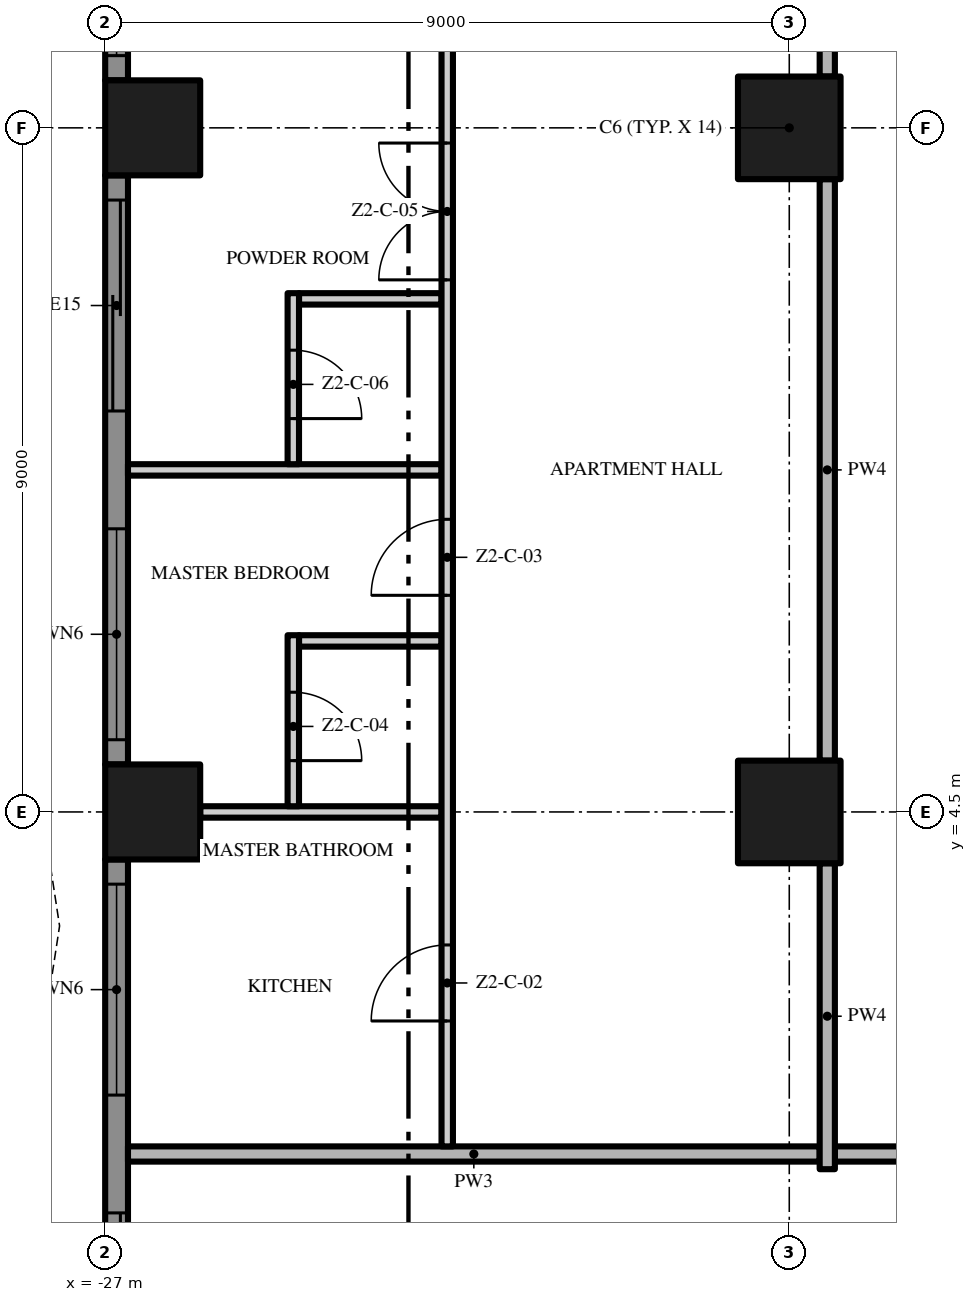
"""IFC4 building model, lengths in metres.
Left out: names, types, materials, properties, quantities, classifications, styles, units other than length and angle.
Written with IfcOpenShell. Run it as: python <this file> out.ifc"""

import sys

from ifc_helpers import new_model, si_unit, direction, frame, frame_2d, origin, origin_2d, place, context, subcontext, project, spatial, polyline, rectangle, outline, extrude, element, fill, save


model = new_model("IFC4")
c1 = context("Model", 3, precision=1e-05, world=origin(), true_north=direction((0.0, 1.0)))
c2 = subcontext(c1, "Body", "Model", "MODEL_VIEW")
j1 = project(units=[si_unit("LENGTHUNIT", "METRE"), si_unit("PLANEANGLEUNIT", "RADIAN")], contexts=[c1])
p1 = place(None, origin())
s1 = spatial("IfcSite", under=j1, at=p1, CompositionType="ELEMENT")
p2 = place(p1, origin())
s2 = spatial("IfcBuilding", under=s1, at=p2, CompositionType="ELEMENT")
p3 = place(p2, frame((0.0, 0.0, 99.8)))
s3 = spatial("IfcBuildingStorey", under=s2, at=p3, CompositionType="ELEMENT", Elevation=99.8)
for number, where, z_axis, x_axis in (
    (1, (-18.0, 13.5, 0.0), (0.0, 0.0, 1.0), (1.0, 0.0, 0.0)),
    (2, (-18.0, 4.5, 0.0), (0.0, 0.0, 1.0), (1.0, 0.0, 0.0)),
):
    element("IfcColumn", number, at=place(p3, frame(where, z_axis=z_axis, x_axis=x_axis)), inside=s3, PredefinedType="COLUMN", context=c2, shape_type="SweptSolid", body=[
        extrude(rectangle(XDim=1.35, YDim=1.35, at=origin_2d()), origin(), (0.0, 0.0, 1.0), 3.5),
    ])
for number, where, z_axis, x_axis in (
    (3, (-26.375, 13.5, 0.0), (0.0, 0.0, 1.0), (1.0, 0.0, 0.0)),
    (4, (-26.375, 4.5, 0.0), (0.0, 0.0, 1.0), (1.0, 0.0, 0.0)),
):
    element("IfcColumn", number, at=place(p3, frame(where, z_axis=z_axis, x_axis=x_axis)), inside=s3, PredefinedType="COLUMN", context=c2, shape_type="SweptSolid", body=[
        extrude(rectangle(XDim=1.25, YDim=1.25, at=origin_2d()), origin(), (0.0, 0.0, 1.0), 3.5),
    ])
p4 = place(p3, frame((-26.85, 14.125, 0.0), z_axis=(0.0, 0.0, 1.0), x_axis=(0.0, 1.0, 0.0)))
e5 = element("IfcWall", 5, at=p4, inside=s3, PredefinedType="SOLIDWALL", context=c2, shape_type="SweptSolid", body=[
    extrude(rectangle(XDim=3.575, YDim=0.3, at=frame_2d((1.788, 0.0))), origin(), (0.0, 0.0, 1.0), 3.5),
])
p5 = place(p4, frame((0.325, 0.0, 0.45)))
e6 = element("IfcOpeningElement", 6, at=p5, cuts=e5, PredefinedType="OPENING", context=c2, shape_type="SweptSolid", body=[
    extrude(rectangle(XDim=2.775, YDim=2.65, at=frame_2d((1.387, 1.325))), frame((0.0, 0.16, 0.0), z_axis=(0.0, -1.0, 0.0), x_axis=(1.0, 0.0, 0.0)), (0.0, 0.0, 1.0), 0.32),
])
p6 = place(p3, frame((-26.85, 5.125, 0.0), z_axis=(0.0, 0.0, 1.0), x_axis=(0.0, 1.0, 0.0)))
e7 = element("IfcWall", 7, at=p6, inside=s3, PredefinedType="SOLIDWALL", context=c2, shape_type="SweptSolid", body=[
    extrude(rectangle(XDim=7.75, YDim=0.3, at=frame_2d((3.875, 0.0))), origin(), (0.0, 0.0, 1.0), 3.5),
])
p7 = place(p6, frame((4.65, 0.0, 0.0)))
e8 = element("IfcOpeningElement", 8, at=p7, cuts=e7, PredefinedType="OPENING", context=c2, shape_type="SweptSolid", body=[
    extrude(rectangle(XDim=2.775, YDim=2.4, at=frame_2d((1.387, 1.2))), frame((0.0, 0.16, 0.0), z_axis=(0.0, -1.0, 0.0), x_axis=(1.0, 0.0, 0.0)), (0.0, 0.0, 1.0), 0.32),
])
p8 = place(p6, frame((0.325, 0.0, 0.45)))
e9 = element("IfcOpeningElement", 9, at=p8, cuts=e7, PredefinedType="OPENING", context=c2, shape_type="SweptSolid", body=[
    extrude(rectangle(XDim=2.775, YDim=2.65, at=frame_2d((1.387, 1.325))), frame((0.0, 0.16, 0.0), z_axis=(0.0, -1.0, 0.0), x_axis=(1.0, 0.0, 0.0)), (0.0, 0.0, 1.0), 0.32),
])
p9 = place(p3, frame((-26.85, -3.875, 0.0), z_axis=(0.0, 0.0, 1.0), x_axis=(0.0, 1.0, 0.0)))
e10 = element("IfcWall", 10, at=p9, inside=s3, PredefinedType="SOLIDWALL", context=c2, shape_type="SweptSolid", body=[
    extrude(rectangle(XDim=7.75, YDim=0.3, at=frame_2d((3.875, 0.0))), origin(), (0.0, 0.0, 1.0), 3.5),
])
p10 = place(p9, frame((4.65, 0.0, 0.45)))
e11 = element("IfcOpeningElement", 11, at=p10, cuts=e10, PredefinedType="OPENING", context=c2, shape_type="SweptSolid", body=[
    extrude(rectangle(XDim=2.775, YDim=2.65, at=frame_2d((1.387, 1.325))), frame((0.0, 0.16, 0.0), z_axis=(0.0, -1.0, 0.0), x_axis=(1.0, 0.0, 0.0)), (0.0, 0.0, 1.0), 0.32),
])
p11 = place(p9, frame((0.325, 0.0, 0.0)))
e12 = element("IfcOpeningElement", 12, at=p11, cuts=e10, PredefinedType="OPENING", context=c2, shape_type="SweptSolid", body=[
    extrude(rectangle(XDim=2.775, YDim=2.4, at=frame_2d((1.387, 1.2))), frame((0.0, 0.16, 0.0), z_axis=(0.0, -1.0, 0.0), x_axis=(1.0, 0.0, 0.0)), (0.0, 0.0, 1.0), 0.32),
])
p12 = place(p3, origin())
e13 = element("IfcWall", 13, at=p12, inside=s3, PredefinedType="USERDEFINED", context=c2, shape_type="SweptSolid", body=[
    extrude(outline(polyline([(-27.6, 18.0), (-27.829, 16.5), (-28.429, 15.0), (-29.171, 13.5), (-29.771, 12.0), (-30.0, 10.5), (-29.771, 9.0), (-29.171, 7.5), (-28.429, 6.0), (-27.829, 4.5), (-27.6, 3.0), (-27.829, 1.5), (-28.429, 0.0), (-29.171, -1.5), (-29.771, -3.0), (-30.0, -4.5), (-29.771, -6.0), (-29.171, -7.5), (-28.429, -9.0), (-27.829, -10.5), (-27.6, -12.0), (-27.829, -13.5), (-28.429, -15.0), (-29.171, -16.5), (-29.771, -18.0), (-29.539, -18.093), (-28.942, -16.602), (-28.201, -15.102), (-27.586, -13.566), (-27.347, -12.0), (-27.586, -10.434), (-28.201, -8.898), (-28.942, -7.398), (-29.528, -5.934), (-29.747, -4.5), (-29.528, -3.066), (-28.942, -1.602), (-28.201, -0.102), (-27.586, 1.434), (-27.347, 3.0), (-27.586, 4.566), (-28.201, 6.102), (-28.942, 7.602), (-29.528, 9.066), (-29.747, 10.5), (-29.528, 11.934), (-28.942, 13.398), (-28.201, 14.898), (-27.586, 16.434), (-27.353, 17.962), (-27.6, 18.0)])), origin(), (0.0, 0.0, 1.0), 0.9),
])
p13 = place(p3, frame((-0.1, 0.0, 0.0), z_axis=(0.0, 0.0, 1.0), x_axis=(-1.0, 0.0, 0.0)))
e14 = element("IfcWall", 14, at=p13, inside=s3, PredefinedType="PARTITIONING", context=c2, shape_type="SweptSolid", body=[
    extrude(rectangle(XDim=17.3, YDim=0.2, at=frame_2d((8.65, 0.0))), origin(), (0.0, 0.0, 1.0), 3.5),
])
p14 = place(p13, frame((8.15, 0.0, 0.0)))
e15 = element("IfcOpeningElement", 15, at=p14, cuts=e14, PredefinedType="OPENING", context=c2, shape_type="SweptSolid", body=[
    extrude(rectangle(XDim=1.5, YDim=2.4, at=frame_2d((0.75, 1.2))), frame((0.0, 0.11, 0.0), z_axis=(0.0, -1.0, 0.0), x_axis=(1.0, 0.0, 0.0)), (0.0, 0.0, 1.0), 0.22),
])
p15 = place(p3, frame((-26.7, 0.0, 0.0), z_axis=(0.0, 0.0, 1.0), x_axis=(1.0, 0.0, 0.0)))
e16 = element("IfcWall", 16, at=p15, inside=s3, PredefinedType="PARTITIONING", context=c2, shape_type="SweptSolid", body=[
    extrude(rectangle(XDim=9.1, YDim=0.2, at=frame_2d((4.55, 0.0))), origin(), (0.0, 0.0, 1.0), 3.5),
])
p16 = place(p3, frame((-25.75, 4.5, 0.0), z_axis=(0.0, 0.0, 1.0), x_axis=(1.0, 0.0, 0.0)))
e17 = element("IfcWall", 17, at=p16, inside=s3, PredefinedType="PARTITIONING", context=c2, shape_type="SweptSolid", body=[
    extrude(rectangle(XDim=3.175, YDim=0.15, at=frame_2d((1.587, 0.0))), origin(), (0.0, 0.0, 1.0), 3.5),
])
p17 = place(p3, frame((-24.45, 6.75, 0.0), z_axis=(0.0, 0.0, 1.0), x_axis=(1.0, 0.0, 0.0)))
e18 = element("IfcWall", 18, at=p17, inside=s3, PredefinedType="PARTITIONING", context=c2, shape_type="SweptSolid", body=[
    extrude(rectangle(XDim=1.875, YDim=0.15, at=frame_2d((0.938, 0.0))), origin(), (0.0, 0.0, 1.0), 3.5),
])
p18 = place(p3, frame((-26.7, 9.0, 0.0), z_axis=(0.0, 0.0, 1.0), x_axis=(1.0, 0.0, 0.0)))
e19 = element("IfcWall", 19, at=p18, inside=s3, PredefinedType="PARTITIONING", context=c2, shape_type="SweptSolid", body=[
    extrude(rectangle(XDim=4.125, YDim=0.15, at=frame_2d((2.062, 0.0))), origin(), (0.0, 0.0, 1.0), 3.5),
])
p19 = place(p3, frame((-24.45, 11.25, 0.0), z_axis=(0.0, 0.0, 1.0), x_axis=(1.0, 0.0, 0.0)))
e20 = element("IfcWall", 20, at=p19, inside=s3, PredefinedType="PARTITIONING", context=c2, shape_type="SweptSolid", body=[
    extrude(rectangle(XDim=1.875, YDim=0.15, at=frame_2d((0.938, 0.0))), origin(), (0.0, 0.0, 1.0), 3.5),
])
p20 = place(p3, frame((-24.525, 6.825, 0.0), z_axis=(0.0, 0.0, 1.0), x_axis=(0.0, -1.0, 0.0)))
e21 = element("IfcWall", 21, at=p20, inside=s3, PredefinedType="PARTITIONING", context=c2, shape_type="SweptSolid", body=[
    extrude(rectangle(XDim=2.25, YDim=0.15, at=frame_2d((1.125, 0.0))), origin(), (0.0, 0.0, 1.0), 3.5),
])
p21 = place(p20, frame((0.75, 0.0, 0.0)))
e22 = element("IfcOpeningElement", 22, at=p21, cuts=e21, PredefinedType="OPENING", context=c2, shape_type="SweptSolid", body=[
    extrude(rectangle(XDim=0.9, YDim=2.1, at=frame_2d((0.45, 1.05))), frame((0.0, 0.085, 0.0), z_axis=(0.0, -1.0, 0.0), x_axis=(1.0, 0.0, 0.0)), (0.0, 0.0, 1.0), 0.17),
])
p22 = place(p3, frame((-24.525, 11.325, 0.0), z_axis=(0.0, 0.0, 1.0), x_axis=(0.0, -1.0, 0.0)))
e23 = element("IfcWall", 23, at=p22, inside=s3, PredefinedType="PARTITIONING", context=c2, shape_type="SweptSolid", body=[
    extrude(rectangle(XDim=2.25, YDim=0.15, at=frame_2d((1.125, 0.0))), origin(), (0.0, 0.0, 1.0), 3.5),
])
p23 = place(p22, frame((0.75, 0.0, 0.0)))
e24 = element("IfcOpeningElement", 24, at=p23, cuts=e23, PredefinedType="OPENING", context=c2, shape_type="SweptSolid", body=[
    extrude(rectangle(XDim=0.9, YDim=2.1, at=frame_2d((0.45, 1.05))), frame((0.0, 0.085, 0.0), z_axis=(0.0, -1.0, 0.0), x_axis=(1.0, 0.0, 0.0)), (0.0, 0.0, 1.0), 0.17),
])
p24 = place(p3, frame((-22.5, 0.1, 0.0), z_axis=(0.0, 0.0, 1.0), x_axis=(0.0, 1.0, 0.0)))
e25 = element("IfcWall", 25, at=p24, inside=s3, PredefinedType="PARTITIONING", context=c2, shape_type="SweptSolid", body=[
    extrude(rectangle(XDim=17.275, YDim=0.15, at=frame_2d((8.637, 0.0))), origin(), (0.0, 0.0, 1.0), 3.5),
])
p25 = place(p24, frame((1.65, 0.0, 0.0)))
e26 = element("IfcOpeningElement", 26, at=p25, cuts=e25, PredefinedType="OPENING", context=c2, shape_type="SweptSolid", body=[
    extrude(rectangle(XDim=1.0, YDim=2.4, at=frame_2d((0.5, 1.2))), frame((0.0, 0.085, 0.0), z_axis=(0.0, -1.0, 0.0), x_axis=(1.0, 0.0, 0.0)), (0.0, 0.0, 1.0), 0.17),
])
p26 = place(p24, frame((7.25, 0.0, 0.0)))
e27 = element("IfcOpeningElement", 27, at=p26, cuts=e25, PredefinedType="OPENING", context=c2, shape_type="SweptSolid", body=[
    extrude(rectangle(XDim=1.0, YDim=2.4, at=frame_2d((0.5, 1.2))), frame((0.0, 0.085, 0.0), z_axis=(0.0, -1.0, 0.0), x_axis=(1.0, 0.0, 0.0)), (0.0, 0.0, 1.0), 0.17),
])
p27 = place(p24, frame((11.4, 0.0, 0.0)))
e28 = element("IfcOpeningElement", 28, at=p27, cuts=e25, PredefinedType="OPENING", context=c2, shape_type="SweptSolid", body=[
    extrude(rectangle(XDim=1.8, YDim=2.4, at=frame_2d((0.9, 1.2))), frame((0.0, 0.085, 0.0), z_axis=(0.0, -1.0, 0.0), x_axis=(1.0, 0.0, 0.0)), (0.0, 0.0, 1.0), 0.17),
])
p28 = place(p3, frame((-17.5, -0.2, 0.0), z_axis=(0.0, 0.0, 1.0), x_axis=(0.0, 1.0, 0.0)))
e29 = element("IfcWall", 29, at=p28, inside=s3, PredefinedType="PARTITIONING", context=c2, shape_type="SweptSolid", body=[
    extrude(rectangle(XDim=4.025, YDim=0.2, at=frame_2d((2.013, 0.0))), origin(), (0.0, 0.0, 1.0), 3.5),
])
p29 = place(p3, frame((-17.5, 5.175, 0.0), z_axis=(0.0, 0.0, 1.0), x_axis=(0.0, 1.0, 0.0)))
e30 = element("IfcWall", 30, at=p29, inside=s3, PredefinedType="PARTITIONING", context=c2, shape_type="SweptSolid", body=[
    extrude(rectangle(XDim=7.65, YDim=0.2, at=frame_2d((3.825, 0.0))), origin(), (0.0, 0.0, 1.0), 3.5),
])
p30 = place(p3, frame((-17.5, 14.175, 0.0), z_axis=(0.0, 0.0, 1.0), x_axis=(0.0, 1.0, 0.0)))
e31 = element("IfcWall", 31, at=p30, inside=s3, PredefinedType="PARTITIONING", context=c2, shape_type="SweptSolid", body=[
    extrude(rectangle(XDim=7.075, YDim=0.2, at=frame_2d((3.538, 0.0))), origin(), (0.0, 0.0, 1.0), 3.5),
])
p31 = place(p30, frame((0.95, 0.0, 0.0)))
e32 = element("IfcOpeningElement", 32, at=p31, cuts=e31, PredefinedType="OPENING", context=c2, shape_type="SweptSolid", body=[
    extrude(rectangle(XDim=1.2, YDim=2.4, at=frame_2d((0.6, 1.2))), frame((0.0, 0.11, 0.0), z_axis=(0.0, -1.0, 0.0), x_axis=(1.0, 0.0, 0.0)), (0.0, 0.0, 1.0), 0.22),
])
p32 = place(p5, origin())
e33 = element("IfcWindow", 33, at=p32, inside=s3, PartitioningType="SINGLE_PANEL", PredefinedType="WINDOW", context=c2, shape_type="SweptSolid", body=[
    extrude(rectangle(XDim=2.775, YDim=2.65, at=frame_2d((1.387, 1.325))), frame((0.0, 0.03, 0.0), z_axis=(0.0, -1.0, 0.0), x_axis=(1.0, 0.0, 0.0)), (0.0, 0.0, 1.0), 0.06),
])
fill(e6, e33)
p33 = place(p7, origin())
e34 = element("IfcDoor", 34, at=p33, inside=s3, OperationType="SINGLE_SWING_LEFT", PredefinedType="DOOR", context=c2, shape_type="SweptSolid", body=[
    extrude(rectangle(XDim=2.775, YDim=2.4, at=frame_2d((1.387, 1.2))), frame((0.0, 0.025, 0.0), z_axis=(0.0, -1.0, 0.0), x_axis=(1.0, 0.0, 0.0)), (0.0, 0.0, 1.0), 0.05),
])
fill(e8, e34)
p34 = place(p8, origin())
e35 = element("IfcWindow", 35, at=p34, inside=s3, PartitioningType="SINGLE_PANEL", PredefinedType="WINDOW", context=c2, shape_type="SweptSolid", body=[
    extrude(rectangle(XDim=2.775, YDim=2.65, at=frame_2d((1.387, 1.325))), frame((0.0, 0.03, 0.0), z_axis=(0.0, -1.0, 0.0), x_axis=(1.0, 0.0, 0.0)), (0.0, 0.0, 1.0), 0.06),
])
fill(e9, e35)
p35 = place(p10, origin())
e36 = element("IfcWindow", 36, at=p35, inside=s3, PartitioningType="SINGLE_PANEL", PredefinedType="WINDOW", context=c2, shape_type="SweptSolid", body=[
    extrude(rectangle(XDim=2.775, YDim=2.65, at=frame_2d((1.387, 1.325))), frame((0.0, 0.03, 0.0), z_axis=(0.0, -1.0, 0.0), x_axis=(1.0, 0.0, 0.0)), (0.0, 0.0, 1.0), 0.06),
])
fill(e11, e36)
p36 = place(p11, origin())
e37 = element("IfcDoor", 37, at=p36, inside=s3, OperationType="SINGLE_SWING_LEFT", PredefinedType="DOOR", context=c2, shape_type="SweptSolid", body=[
    extrude(rectangle(XDim=2.775, YDim=2.4, at=frame_2d((1.387, 1.2))), frame((0.0, 0.025, 0.0), z_axis=(0.0, -1.0, 0.0), x_axis=(1.0, 0.0, 0.0)), (0.0, 0.0, 1.0), 0.05),
])
fill(e12, e37)
p37 = place(p25, origin())
e38 = element("IfcDoor", 38, at=p37, inside=s3, OperationType="SINGLE_SWING_LEFT", PredefinedType="DOOR", context=c2, shape_type="SweptSolid", body=[
    extrude(rectangle(XDim=1.0, YDim=2.4, at=frame_2d((0.5, 1.2))), frame((0.0, 0.025, 0.0), z_axis=(0.0, -1.0, 0.0), x_axis=(1.0, 0.0, 0.0)), (0.0, 0.0, 1.0), 0.05),
])
fill(e26, e38)
p38 = place(p26, origin())
e39 = element("IfcDoor", 39, at=p38, inside=s3, OperationType="SINGLE_SWING_LEFT", PredefinedType="DOOR", context=c2, shape_type="SweptSolid", body=[
    extrude(rectangle(XDim=1.0, YDim=2.4, at=frame_2d((0.5, 1.2))), frame((0.0, 0.025, 0.0), z_axis=(0.0, -1.0, 0.0), x_axis=(1.0, 0.0, 0.0)), (0.0, 0.0, 1.0), 0.05),
])
fill(e27, e39)
p39 = place(p21, origin())
e40 = element("IfcDoor", 40, at=p39, inside=s3, OperationType="SINGLE_SWING_RIGHT", PredefinedType="DOOR", context=c2, shape_type="SweptSolid", body=[
    extrude(rectangle(XDim=0.9, YDim=2.1, at=frame_2d((0.45, 1.05))), frame((0.0, 0.025, 0.0), z_axis=(0.0, -1.0, 0.0), x_axis=(1.0, 0.0, 0.0)), (0.0, 0.0, 1.0), 0.05),
])
fill(e22, e40)
p40 = place(p27, origin())
e41 = element("IfcDoor", 41, at=p40, inside=s3, OperationType="DOUBLE_DOOR_SINGLE_SWING", PredefinedType="DOOR", context=c2, shape_type="SweptSolid", body=[
    extrude(rectangle(XDim=1.8, YDim=2.4, at=frame_2d((0.9, 1.2))), frame((0.0, 0.025, 0.0), z_axis=(0.0, -1.0, 0.0), x_axis=(1.0, 0.0, 0.0)), (0.0, 0.0, 1.0), 0.05),
])
fill(e28, e41)
p41 = place(p23, origin())
e42 = element("IfcDoor", 42, at=p41, inside=s3, OperationType="SINGLE_SWING_RIGHT", PredefinedType="DOOR", context=c2, shape_type="SweptSolid", body=[
    extrude(rectangle(XDim=0.9, YDim=2.1, at=frame_2d((0.45, 1.05))), frame((0.0, 0.025, 0.0), z_axis=(0.0, -1.0, 0.0), x_axis=(1.0, 0.0, 0.0)), (0.0, 0.0, 1.0), 0.05),
])
fill(e24, e42)
save(model, sys.argv[1])
